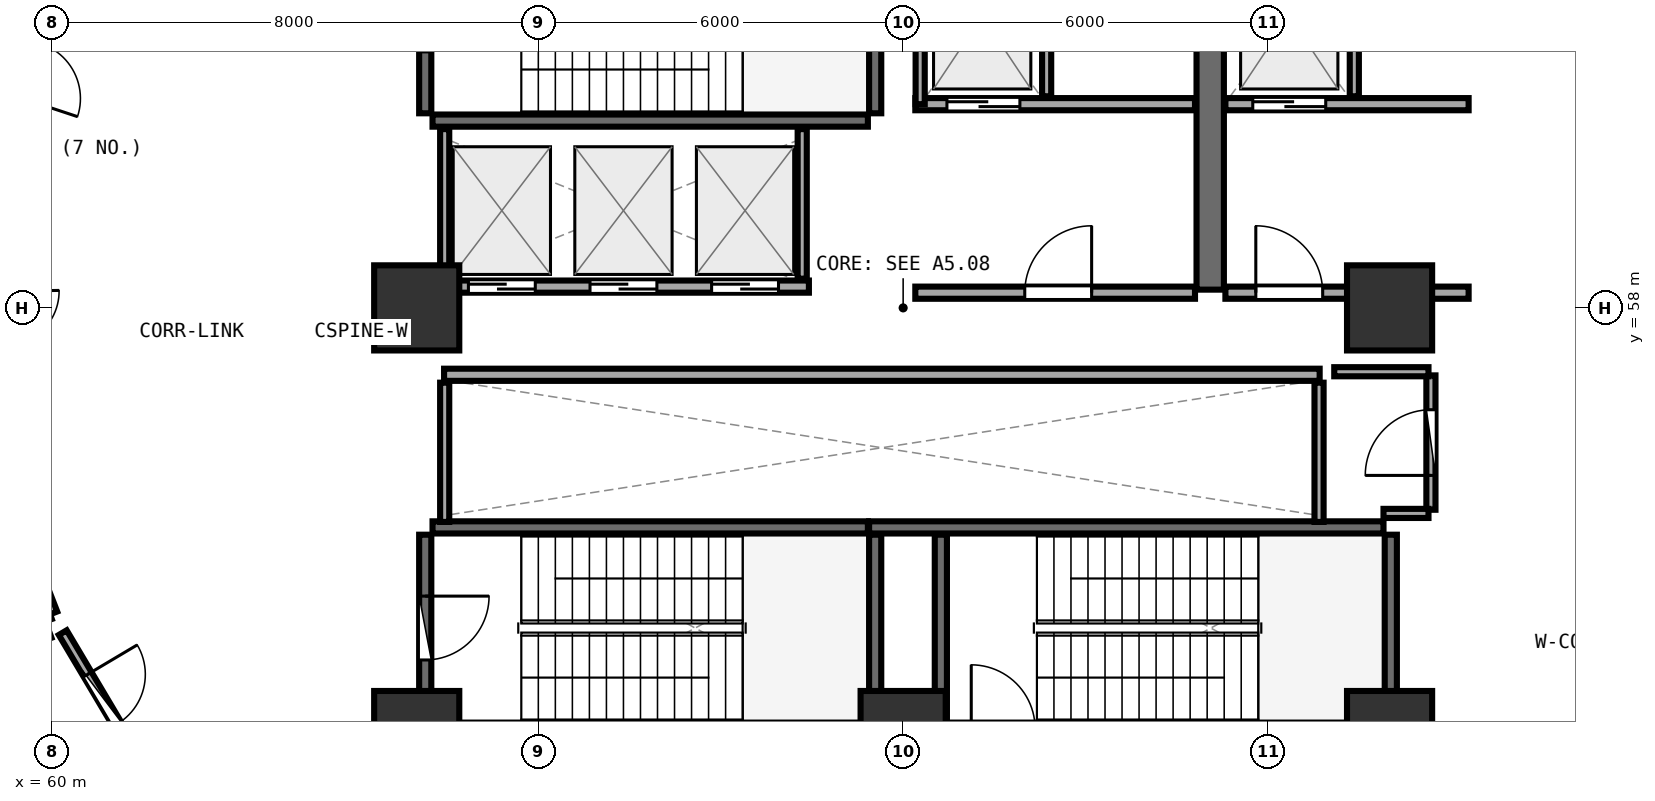
"""IFC4 building model, lengths in metres.
Left out: names, types, materials, properties, quantities, classifications, styles, units other than length and angle.
Written with IfcOpenShell. Run it as: python <this file> out.ifc"""

import sys

from ifc_helpers import new_model, si_unit, direction, frame, frame_2d, origin, origin_2d, place, context, subcontext, project, spatial, rectangle, extrude, element, fill, save


model = new_model("IFC4")
c1 = context("Model", 3, precision=1e-05, world=origin(), true_north=direction((0.0, 1.0)))
c2 = subcontext(c1, "Body", "Model", "MODEL_VIEW")
j1 = project(units=[si_unit("LENGTHUNIT", "METRE"), si_unit("PLANEANGLEUNIT", "RADIAN")], contexts=[c1])
p1 = place(None, origin())
s1 = spatial("IfcSite", under=j1, at=p1, CompositionType="ELEMENT")
p2 = place(p1, origin())
s2 = spatial("IfcBuilding", under=s1, at=p2, CompositionType="ELEMENT")
p3 = place(p2, frame((0.0, 0.0, 67.5)))
s3 = spatial("IfcBuildingStorey", under=s2, at=p3, CompositionType="ELEMENT", Elevation=67.5)
for number, where, z_axis, x_axis in (
    (1, (66.0, 51.0, 0.0), (0.0, 0.0, 1.0), (1.0, 0.0, 0.0)),
    (2, (74.0, 51.0, 0.0), (0.0, 0.0, 1.0), (1.0, 0.0, 0.0)),
    (3, (82.0, 51.0, 0.0), (0.0, 0.0, 1.0), (1.0, 0.0, 0.0)),
    (4, (82.0, 58.0, 0.0), (0.0, 0.0, 1.0), (1.0, 0.0, 0.0)),
    (5, (66.0, 58.0, 0.0), (0.0, 0.0, 1.0), (1.0, 0.0, 0.0)),
):
    element("IfcColumn", number, at=place(p3, frame(where, z_axis=z_axis, x_axis=x_axis)), inside=s3, PredefinedType="PILASTER", context=c2, shape_type="SweptSolid", body=[
        extrude(rectangle(XDim=1.4, YDim=1.4, at=origin_2d()), origin(), (0.0, 0.0, 1.0), 4.76),
    ])
p4 = place(p3, frame((66.26, 61.08, 0.0), z_axis=(0.0, 0.0, 1.0), x_axis=(1.0, 0.0, 0.0)))
e6 = element("IfcWall", 6, at=p4, inside=s3, PredefinedType="SHEAR", context=c2, shape_type="SweptSolid", body=[
    extrude(rectangle(XDim=7.16, YDim=0.2, at=frame_2d((3.58, 0.0))), origin(), (0.0, 0.0, 1.0), 4.36),
])
p5 = place(p3, frame((73.54, 61.2, 0.0), z_axis=(0.0, 0.0, 1.0), x_axis=(0.0, 1.0, 0.0)))
e7 = element("IfcWall", 7, at=p5, inside=s3, PredefinedType="SHEAR", context=c2, shape_type="SweptSolid", body=[
    extrude(rectangle(XDim=3.07, YDim=0.2, at=frame_2d((1.535, 0.0))), origin(), (0.0, 0.0, 1.0), 4.36),
])
p6 = place(p3, frame((66.14, 64.27, 0.0), z_axis=(0.0, 0.0, 1.0), x_axis=(0.0, -1.0, 0.0)))
e8 = element("IfcWall", 8, at=p6, inside=s3, PredefinedType="SHEAR", context=c2, shape_type="SweptSolid", body=[
    extrude(rectangle(XDim=3.07, YDim=0.2, at=frame_2d((1.535, 0.0))), origin(), (0.0, 0.0, 1.0), 4.36),
])
p7 = place(p6, frame((1.01, 0.0, 0.0)))
e9 = element("IfcOpeningElement", 9, at=p7, cuts=e8, PredefinedType="OPENING", context=c2, shape_type="SweptSolid", body=[
    extrude(rectangle(XDim=1.05, YDim=2.1, at=frame_2d((0.525, 1.05))), frame((0.0, 0.11, 0.0), z_axis=(0.0, -1.0, 0.0), x_axis=(1.0, 0.0, 0.0)), (0.0, 0.0, 1.0), 0.22),
])
p8 = place(p3, frame((82.02, 51.2, 0.0), z_axis=(0.0, 0.0, 1.0), x_axis=(0.0, 1.0, 0.0)))
e10 = element("IfcWall", 10, at=p8, inside=s3, PredefinedType="SHEAR", context=c2, shape_type="SweptSolid", body=[
    extrude(rectangle(XDim=3.07, YDim=0.2, at=frame_2d((1.535, 0.0))), origin(), (0.0, 0.0, 1.0), 4.36),
])
p9 = place(p3, frame((81.9, 54.39, 0.0), z_axis=(0.0, 0.0, 1.0), x_axis=(-1.0, 0.0, 0.0)))
e11 = element("IfcWall", 11, at=p9, inside=s3, PredefinedType="SHEAR", context=c2, shape_type="SweptSolid", body=[
    extrude(rectangle(XDim=8.46, YDim=0.2, at=frame_2d((4.23, 0.0))), origin(), (0.0, 0.0, 1.0), 4.36),
])
for number, where, z_axis, x_axis in (
    (12, (74.62, 54.27, 0.0), (0.0, 0.0, 1.0), (0.0, -1.0, 0.0)),
    (13, (73.54, 51.2, 0.0), (0.0, 0.0, 1.0), (0.0, 1.0, 0.0)),
):
    element("IfcWall", number, at=place(p3, frame(where, z_axis=z_axis, x_axis=x_axis)), inside=s3, PredefinedType="SHEAR", context=c2, shape_type="SweptSolid", body=[
        extrude(rectangle(XDim=3.07, YDim=0.2, at=frame_2d((1.535, 0.0))), origin(), (0.0, 0.0, 1.0), 4.36),
    ])
p10 = place(p3, frame((73.42, 54.39, 0.0), z_axis=(0.0, 0.0, 1.0), x_axis=(-1.0, 0.0, 0.0)))
e14 = element("IfcWall", 14, at=p10, inside=s3, PredefinedType="SHEAR", context=c2, shape_type="SweptSolid", body=[
    extrude(rectangle(XDim=7.16, YDim=0.2, at=frame_2d((3.58, 0.0))), origin(), (0.0, 0.0, 1.0), 4.36),
])
p11 = place(p3, frame((66.14, 54.27, 0.0), z_axis=(0.0, 0.0, 1.0), x_axis=(0.0, -1.0, 0.0)))
e15 = element("IfcWall", 15, at=p11, inside=s3, PredefinedType="SHEAR", context=c2, shape_type="SweptSolid", body=[
    extrude(rectangle(XDim=3.07, YDim=0.2, at=frame_2d((1.535, 0.0))), origin(), (0.0, 0.0, 1.0), 4.36),
])
p12 = place(p11, frame((1.01, 0.0, 0.0)))
e16 = element("IfcOpeningElement", 16, at=p12, cuts=e15, PredefinedType="OPENING", context=c2, shape_type="SweptSolid", body=[
    extrude(rectangle(XDim=1.05, YDim=2.1, at=frame_2d((0.525, 1.05))), frame((0.0, 0.11, 0.0), z_axis=(0.0, -1.0, 0.0), x_axis=(1.0, 0.0, 0.0)), (0.0, 0.0, 1.0), 0.22),
])
p13 = place(p3, frame((79.05, 58.3, 0.0), z_axis=(0.0, 0.0, 1.0), x_axis=(0.0, 1.0, 0.0)))
e17 = element("IfcWall", 17, at=p13, inside=s3, PredefinedType="SHEAR", context=c2, shape_type="SweptSolid", body=[
    extrude(rectangle(XDim=6.3, YDim=0.45, at=frame_2d((3.15, 0.0))), origin(), (0.0, 0.0, 1.0), 4.36),
])
p14 = place(p3, frame((74.2, 61.35, 0.0), z_axis=(0.0, 0.0, 1.0), x_axis=(1.0, 0.0, 0.0)))
e18 = element("IfcWall", 18, at=p14, inside=s3, PredefinedType="SOLIDWALL", context=c2, shape_type="SweptSolid", body=[
    extrude(rectangle(XDim=4.6, YDim=0.2, at=frame_2d((2.3, 0.0))), origin(), (0.0, 0.0, 1.0), 4.35),
])
p15 = place(p14, frame((0.52, 0.0, 0.0)))
e19 = element("IfcOpeningElement", 19, at=p15, cuts=e18, PredefinedType="OPENING", context=c2, shape_type="SweptSolid", body=[
    extrude(rectangle(XDim=1.2, YDim=2.15, at=frame_2d((0.6, 1.075))), frame((0.0, 0.11, 0.0), z_axis=(0.0, -1.0, 0.0), x_axis=(1.0, 0.0, 0.0)), (0.0, 0.0, 1.0), 0.22),
])
p16 = place(p3, frame((74.28, 61.35, 0.0), z_axis=(0.0, 0.0, 1.0), x_axis=(0.0, 1.0, 0.0)))
e20 = element("IfcWall", 20, at=p16, inside=s3, PredefinedType="PARTITIONING", context=c2, shape_type="SweptSolid", body=[
    extrude(rectangle(XDim=2.97, YDim=0.15, at=frame_2d((1.485, 0.0))), origin(), (0.0, 0.0, 1.0), 4.35),
])
p17 = place(p3, frame((76.36, 61.48, 0.0), z_axis=(0.0, 0.0, 1.0), x_axis=(0.0, 1.0, 0.0)))
e21 = element("IfcWall", 21, at=p17, inside=s3, PredefinedType="PARTITIONING", context=c2, shape_type="SweptSolid", body=[
    extrude(rectangle(XDim=2.84, YDim=0.15, at=frame_2d((1.42, 0.0))), origin(), (0.0, 0.0, 1.0), 4.35),
])
p18 = place(p3, frame((79.3, 61.35, 0.0), z_axis=(0.0, 0.0, 1.0), x_axis=(1.0, 0.0, 0.0)))
e22 = element("IfcWall", 22, at=p18, inside=s3, PredefinedType="SOLIDWALL", context=c2, shape_type="SweptSolid", body=[
    extrude(rectangle(XDim=4.0, YDim=0.2, at=frame_2d((2.0, 0.0))), origin(), (0.0, 0.0, 1.0), 3.645),
])
p19 = place(p18, frame((0.45, 0.0, 0.0)))
e23 = element("IfcOpeningElement", 23, at=p19, cuts=e22, PredefinedType="OPENING", context=c2, shape_type="SweptSolid", body=[
    extrude(rectangle(XDim=1.2, YDim=2.15, at=frame_2d((0.6, 1.075))), frame((0.0, 0.11, 0.0), z_axis=(0.0, -1.0, 0.0), x_axis=(1.0, 0.0, 0.0)), (0.0, 0.0, 1.0), 0.22),
])
p20 = place(p3, frame((81.42, 61.48, 0.0), z_axis=(0.0, 0.0, 1.0), x_axis=(0.0, 1.0, 0.0)))
e24 = element("IfcWall", 24, at=p20, inside=s3, PredefinedType="PARTITIONING", context=c2, shape_type="SweptSolid", body=[
    extrude(rectangle(XDim=2.84, YDim=0.15, at=frame_2d((1.42, 0.0))), origin(), (0.0, 0.0, 1.0), 4.35),
])
p21 = place(p3, frame((74.2, 58.25, 0.0), z_axis=(0.0, 0.0, 1.0), x_axis=(1.0, 0.0, 0.0)))
e25 = element("IfcWall", 25, at=p21, inside=s3, PredefinedType="SOLIDWALL", context=c2, shape_type="SweptSolid", body=[
    extrude(rectangle(XDim=4.6, YDim=0.2, at=frame_2d((2.3, 0.0))), origin(), (0.0, 0.0, 1.0), 4.35),
])
p22 = place(p21, frame((1.8, 0.0, 0.0)))
e26 = element("IfcOpeningElement", 26, at=p22, cuts=e25, PredefinedType="OPENING", context=c2, shape_type="SweptSolid", body=[
    extrude(rectangle(XDim=1.1, YDim=2.1, at=frame_2d((0.55, 1.05))), frame((0.0, 0.11, 0.0), z_axis=(0.0, -1.0, 0.0), x_axis=(1.0, 0.0, 0.0)), (0.0, 0.0, 1.0), 0.22),
])
p23 = place(p3, frame((79.3, 58.25, 0.0), z_axis=(0.0, 0.0, 1.0), x_axis=(1.0, 0.0, 0.0)))
e27 = element("IfcWall", 27, at=p23, inside=s3, PredefinedType="SOLIDWALL", context=c2, shape_type="SweptSolid", body=[
    extrude(rectangle(XDim=4.0, YDim=0.2, at=frame_2d((2.0, 0.0))), origin(), (0.0, 0.0, 1.0), 2.345),
])
p24 = place(p23, frame((0.5, 0.0, 0.0)))
e28 = element("IfcOpeningElement", 28, at=p24, cuts=e27, PredefinedType="OPENING", context=c2, shape_type="SweptSolid", body=[
    extrude(rectangle(XDim=1.1, YDim=2.1, at=frame_2d((0.55, 1.05))), frame((0.0, 0.11, 0.0), z_axis=(0.0, -1.0, 0.0), x_axis=(1.0, 0.0, 0.0)), (0.0, 0.0, 1.0), 0.22),
])
p25 = place(p3, frame((66.45, 58.35, 0.0), z_axis=(0.0, 0.0, 1.0), x_axis=(1.0, 0.0, 0.0)))
e29 = element("IfcWall", 29, at=p25, inside=s3, PredefinedType="SOLIDWALL", context=c2, shape_type="SweptSolid", body=[
    extrude(rectangle(XDim=6.0, YDim=0.2, at=frame_2d((3.0, 0.0))), origin(), (0.0, 0.0, 1.0), 4.35),
])
p26 = place(p25, frame((0.4, 0.0, 0.0)))
e30 = element("IfcOpeningElement", 30, at=p26, cuts=e29, PredefinedType="OPENING", context=c2, shape_type="SweptSolid", body=[
    extrude(rectangle(XDim=1.1, YDim=2.1, at=frame_2d((0.55, 1.05))), frame((0.0, 0.11, 0.0), z_axis=(0.0, -1.0, 0.0), x_axis=(1.0, 0.0, 0.0)), (0.0, 0.0, 1.0), 0.22),
])
p27 = place(p25, frame((2.4, 0.0, 0.0)))
e31 = element("IfcOpeningElement", 31, at=p27, cuts=e29, PredefinedType="OPENING", context=c2, shape_type="SweptSolid", body=[
    extrude(rectangle(XDim=1.1, YDim=2.1, at=frame_2d((0.55, 1.05))), frame((0.0, 0.11, 0.0), z_axis=(0.0, -1.0, 0.0), x_axis=(1.0, 0.0, 0.0)), (0.0, 0.0, 1.0), 0.22),
])
p28 = place(p25, frame((4.4, 0.0, 0.0)))
e32 = element("IfcOpeningElement", 32, at=p28, cuts=e29, PredefinedType="OPENING", context=c2, shape_type="SweptSolid", body=[
    extrude(rectangle(XDim=1.1, YDim=2.1, at=frame_2d((0.55, 1.05))), frame((0.0, 0.11, 0.0), z_axis=(0.0, -1.0, 0.0), x_axis=(1.0, 0.0, 0.0)), (0.0, 0.0, 1.0), 0.22),
])
for number, where, z_axis, x_axis in (
    (33, (66.46, 58.48, 0.0), (0.0, 0.0, 1.0), (0.0, 1.0, 0.0)),
    (34, (72.34, 58.48, 0.0), (0.0, 0.0, 1.0), (0.0, 1.0, 0.0)),
):
    element("IfcWall", number, at=place(p3, frame(where, z_axis=z_axis, x_axis=x_axis)), inside=s3, PredefinedType="PARTITIONING", context=c2, shape_type="SweptSolid", body=[
        extrude(rectangle(XDim=2.46, YDim=0.15, at=frame_2d((1.23, 0.0))), origin(), (0.0, 0.0, 1.0), 4.35),
    ])
p29 = place(p3, frame((66.45, 56.9, 0.0), z_axis=(0.0, 0.0, 1.0), x_axis=(1.0, 0.0, 0.0)))
e35 = element("IfcWall", 35, at=p29, inside=s3, PredefinedType="SOLIDWALL", context=c2, shape_type="SweptSolid", body=[
    extrude(rectangle(XDim=14.4, YDim=0.2, at=frame_2d((7.2, 0.0))), origin(), (0.0, 0.0, 1.0), 4.35),
])
for number, where, z_axis, x_axis in (
    (36, (66.46, 54.48, 0.0), (0.0, 0.0, 1.0), (0.0, 1.0, 0.0)),
    (37, (80.84, 54.48, 0.0), (0.0, 0.0, 1.0), (0.0, 1.0, 0.0)),
):
    element("IfcWall", number, at=place(p3, frame(where, z_axis=z_axis, x_axis=x_axis)), inside=s3, PredefinedType="PARTITIONING", context=c2, shape_type="SweptSolid", body=[
        extrude(rectangle(XDim=2.29, YDim=0.15, at=frame_2d((1.145, 0.0))), origin(), (0.0, 0.0, 1.0), 4.35),
    ])
p30 = place(p3, frame((82.68, 54.68, 0.0), z_axis=(0.0, 0.0, 1.0), x_axis=(0.0, 1.0, 0.0)))
e38 = element("IfcWall", 38, at=p30, inside=s3, PredefinedType="PARTITIONING", context=c2, shape_type="SweptSolid", body=[
    extrude(rectangle(XDim=2.21, YDim=0.15, at=frame_2d((1.105, 0.0))), origin(), (0.0, 0.0, 1.0), 4.35),
])
p31 = place(p30, frame((0.565, 0.0, 0.0)))
e39 = element("IfcOpeningElement", 39, at=p31, cuts=e38, PredefinedType="OPENING", context=c2, shape_type="SweptSolid", body=[
    extrude(rectangle(XDim=1.08, YDim=2.1, at=frame_2d((0.54, 1.05))), frame((0.0, 0.085, 0.0), z_axis=(0.0, -1.0, 0.0), x_axis=(1.0, 0.0, 0.0)), (0.0, 0.0, 1.0), 0.17),
])
p32 = place(p3, frame((60.062, 63.085, 0.0), z_axis=(0.0, 0.0, 1.0), x_axis=(-0.313977919329, -0.949430285052, 0.0)))
e40 = element("IfcWall", 40, at=p32, inside=s3, PredefinedType="PARTITIONING", context=c2, shape_type="SweptSolid", body=[
    extrude(rectangle(XDim=2.508, YDim=0.15, at=frame_2d((1.254, 0.0))), origin(), (0.0, 0.0, 1.0), 4.105),
])
p33 = place(p32, frame((0.779, 0.0, 0.0)))
e41 = element("IfcOpeningElement", 41, at=p33, cuts=e40, PredefinedType="OPENING", context=c2, shape_type="SweptSolid", body=[
    extrude(rectangle(XDim=0.95, YDim=2.08, at=frame_2d((0.475, 1.04))), frame((0.0, 0.085, 0.0), z_axis=(0.0, -1.0, 0.0), x_axis=(1.0, 0.0, 0.0)), (0.0, 0.0, 1.0), 0.17),
])
p34 = place(p3, frame((60.179, 52.659, 0.0), z_axis=(0.0, 0.0, 1.0), x_axis=(0.510684908265, -0.859767948036, 0.0)))
e42 = element("IfcWall", 42, at=p34, inside=s3, PredefinedType="PARTITIONING", context=c2, shape_type="SweptSolid", body=[
    extrude(rectangle(XDim=2.547, YDim=0.15, at=frame_2d((1.273, 0.0))), origin(), (0.0, 0.0, 1.0), 2.345),
])
p35 = place(p34, frame((0.799, 0.0, 0.0)))
e43 = element("IfcOpeningElement", 43, at=p35, cuts=e42, PredefinedType="OPENING", context=c2, shape_type="SweptSolid", body=[
    extrude(rectangle(XDim=0.95, YDim=2.08, at=frame_2d((0.475, 1.04))), frame((0.0, 0.085, 0.0), z_axis=(0.0, -1.0, 0.0), x_axis=(1.0, 0.0, 0.0)), (0.0, 0.0, 1.0), 0.17),
])
p36 = place(p3, frame((81.9, 54.62, 0.0), z_axis=(0.0, 0.0, 1.0), x_axis=(1.0, 0.0, 0.0)))
e44 = element("IfcWall", 44, at=p36, inside=s3, PredefinedType="PARTITIONING", context=c2, shape_type="SweptSolid", body=[
    extrude(rectangle(XDim=0.74, YDim=0.15, at=frame_2d((0.37, 0.0))), origin(), (0.0, 0.0, 1.0), 3.645),
])
p37 = place(p3, frame((82.64, 56.95, 0.0), z_axis=(0.0, 0.0, 1.0), x_axis=(-1.0, 0.0, 0.0)))
e45 = element("IfcWall", 45, at=p37, inside=s3, PredefinedType="PARTITIONING", context=c2, shape_type="SweptSolid", body=[
    extrude(rectangle(XDim=1.55, YDim=0.15, at=frame_2d((0.775, 0.0))), origin(), (0.0, 0.0, 1.0), 3.645),
])
p38 = place(p3, frame((59.649, 53.952, 0.0), z_axis=(0.0, 0.0, 1.0), x_axis=(0.362514197989, -0.931978248811, 0.0)))
e46 = element("IfcWall", 46, at=p38, inside=s3, PredefinedType="PLUMBINGWALL", context=c2, shape_type="SweptSolid", body=[
    extrude(rectangle(XDim=1.041, YDim=0.13, at=frame_2d((0.52, 0.0))), origin(), (0.0, 0.0, 1.0), 4.105),
])
p39 = place(p12, origin())
e47 = element("IfcDoor", 47, at=p39, inside=s3, OperationType="SINGLE_SWING_LEFT", PredefinedType="DOOR", context=c2, shape_type="SweptSolid", body=[
    extrude(rectangle(XDim=1.05, YDim=2.1, at=frame_2d((0.525, 1.05))), frame((0.0, 0.025, 0.0), z_axis=(0.0, -1.0, 0.0), x_axis=(1.0, 0.0, 0.0)), (0.0, 0.0, 1.0), 0.05),
])
fill(e16, e47)
p40 = place(p15, origin())
e48 = element("IfcDoor", 48, at=p40, inside=s3, OperationType="DOUBLE_DOOR_SLIDING", PredefinedType="DOOR", context=c2, shape_type="SweptSolid", body=[
    extrude(rectangle(XDim=1.2, YDim=2.15, at=frame_2d((0.6, 1.075))), frame((0.0, 0.025, 0.0), z_axis=(0.0, -1.0, 0.0), x_axis=(1.0, 0.0, 0.0)), (0.0, 0.0, 1.0), 0.05),
])
fill(e19, e48)
p41 = place(p19, origin())
e49 = element("IfcDoor", 49, at=p41, inside=s3, OperationType="DOUBLE_DOOR_SLIDING", PredefinedType="DOOR", context=c2, shape_type="SweptSolid", body=[
    extrude(rectangle(XDim=1.2, YDim=2.15, at=frame_2d((0.6, 1.075))), frame((0.0, 0.025, 0.0), z_axis=(0.0, -1.0, 0.0), x_axis=(1.0, 0.0, 0.0)), (0.0, 0.0, 1.0), 0.05),
])
fill(e23, e49)
p42 = place(p22, frame((1.1, 0.0, 0.0), z_axis=(0.0, 0.0, 1.0), x_axis=(-1.0, 0.0, 0.0)))
e50 = element("IfcDoor", 50, at=p42, inside=s3, OperationType="SINGLE_SWING_LEFT", PredefinedType="DOOR", context=c2, shape_type="SweptSolid", body=[
    extrude(rectangle(XDim=1.1, YDim=2.1, at=frame_2d((0.55, 1.05))), frame((0.0, 0.025, 0.0), z_axis=(0.0, -1.0, 0.0), x_axis=(1.0, 0.0, 0.0)), (0.0, 0.0, 1.0), 0.05),
])
fill(e26, e50)
p43 = place(p24, frame((1.1, 0.0, 0.0), z_axis=(0.0, 0.0, 1.0), x_axis=(-1.0, 0.0, 0.0)))
e51 = element("IfcDoor", 51, at=p43, inside=s3, OperationType="SINGLE_SWING_RIGHT", PredefinedType="DOOR", context=c2, shape_type="SweptSolid", body=[
    extrude(rectangle(XDim=1.1, YDim=2.1, at=frame_2d((0.55, 1.05))), frame((0.0, 0.025, 0.0), z_axis=(0.0, -1.0, 0.0), x_axis=(1.0, 0.0, 0.0)), (0.0, 0.0, 1.0), 0.05),
])
fill(e28, e51)
p44 = place(p26, origin())
e52 = element("IfcDoor", 52, at=p44, inside=s3, OperationType="DOUBLE_DOOR_SLIDING", PredefinedType="DOOR", context=c2, shape_type="SweptSolid", body=[
    extrude(rectangle(XDim=1.1, YDim=2.1, at=frame_2d((0.55, 1.05))), frame((0.0, 0.025, 0.0), z_axis=(0.0, -1.0, 0.0), x_axis=(1.0, 0.0, 0.0)), (0.0, 0.0, 1.0), 0.05),
])
fill(e30, e52)
p45 = place(p27, origin())
e53 = element("IfcDoor", 53, at=p45, inside=s3, OperationType="DOUBLE_DOOR_SLIDING", PredefinedType="DOOR", context=c2, shape_type="SweptSolid", body=[
    extrude(rectangle(XDim=1.1, YDim=2.1, at=frame_2d((0.55, 1.05))), frame((0.0, 0.025, 0.0), z_axis=(0.0, -1.0, 0.0), x_axis=(1.0, 0.0, 0.0)), (0.0, 0.0, 1.0), 0.05),
])
fill(e31, e53)
p46 = place(p28, origin())
e54 = element("IfcDoor", 54, at=p46, inside=s3, OperationType="DOUBLE_DOOR_SLIDING", PredefinedType="DOOR", context=c2, shape_type="SweptSolid", body=[
    extrude(rectangle(XDim=1.1, YDim=2.1, at=frame_2d((0.55, 1.05))), frame((0.0, 0.025, 0.0), z_axis=(0.0, -1.0, 0.0), x_axis=(1.0, 0.0, 0.0)), (0.0, 0.0, 1.0), 0.05),
])
fill(e32, e54)
p47 = place(p31, origin())
e55 = element("IfcDoor", 55, at=p47, inside=s3, OperationType="SINGLE_SWING_LEFT", PredefinedType="DOOR", context=c2, shape_type="SweptSolid", body=[
    extrude(rectangle(XDim=1.08, YDim=2.1, at=frame_2d((0.54, 1.05))), frame((0.0, 0.025, 0.0), z_axis=(0.0, -1.0, 0.0), x_axis=(1.0, 0.0, 0.0)), (0.0, 0.0, 1.0), 0.05),
])
fill(e39, e55)
p48 = place(p35, origin())
e56 = element("IfcDoor", 56, at=p48, inside=s3, OperationType="SINGLE_SWING_LEFT", PredefinedType="DOOR", context=c2, shape_type="SweptSolid", body=[
    extrude(rectangle(XDim=0.95, YDim=2.08, at=frame_2d((0.475, 1.04))), frame((0.0, 0.025, 0.0), z_axis=(0.0, -1.0, 0.0), x_axis=(1.0, 0.0, 0.0)), (0.0, 0.0, 1.0), 0.05),
])
fill(e43, e56)
save(model, sys.argv[1])
